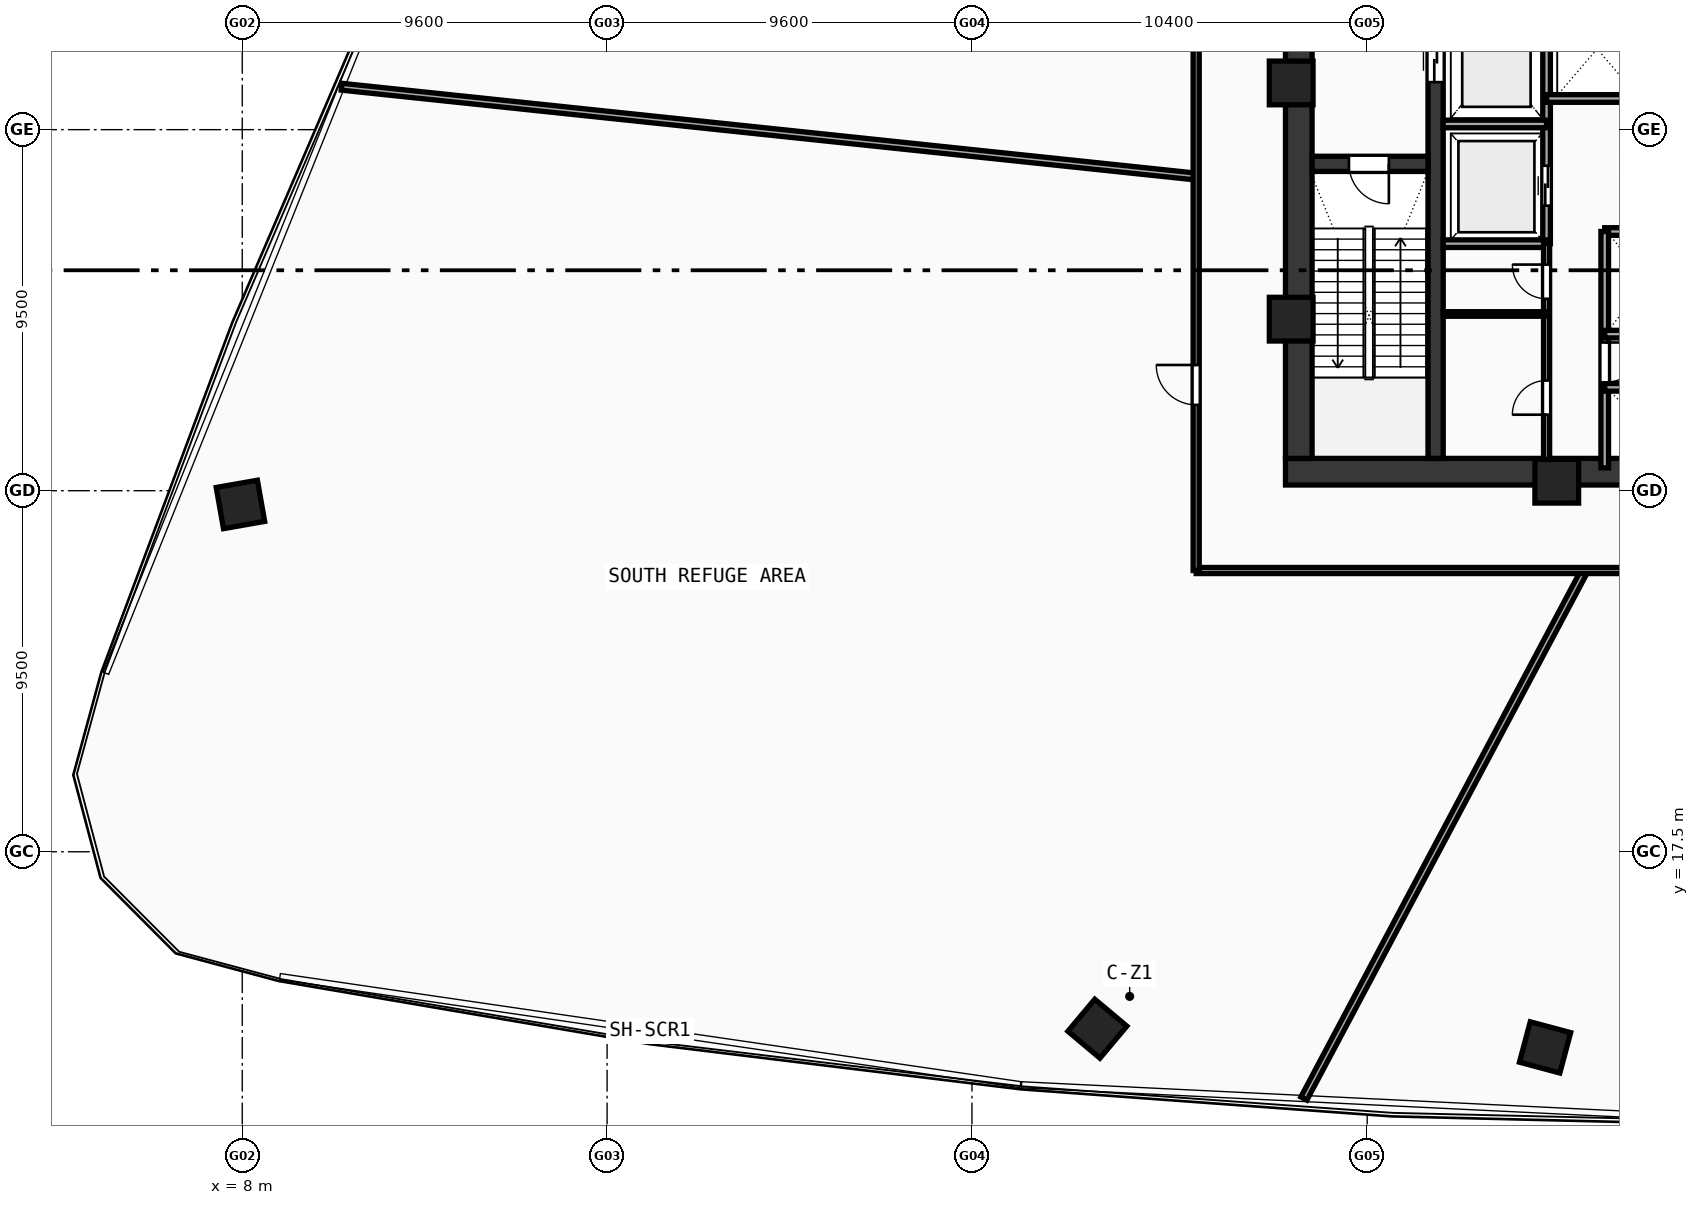
"""IFC4 building model, lengths in metres.
Left out: names, types, materials, properties, quantities, classifications, styles, units other than length and angle.
Written with IfcOpenShell. Run it as: python <this file> out.ifc"""

import sys

from ifc_helpers import new_model, si_unit, direction, frame, frame_2d, origin, origin_with_axes, origin_2d, place, context, subcontext, project, spatial, rectangle, hollow_rectangle, extrude, source, transform, mapped, element, fill, save


model = new_model("IFC4")
c1 = context("Model", 3, precision=1e-05, world=origin(), true_north=direction((0.0, 1.0)))
c2 = subcontext(c1, "Body", "Model", "MODEL_VIEW")
j1 = project(units=[si_unit("LENGTHUNIT", "METRE"), si_unit("PLANEANGLEUNIT", "RADIAN")], contexts=[c1])
p1 = place(None, origin())
s1 = spatial("IfcSite", under=j1, at=p1, CompositionType="ELEMENT")
p2 = place(p1, origin())
s2 = spatial("IfcBuilding", under=s1, at=p2, CompositionType="ELEMENT")
p3 = place(p2, frame((0.0, 0.0, 25.4)))
s3 = spatial("IfcBuildingStorey", under=s2, at=p3, CompositionType="ELEMENT", Elevation=25.4)
p4 = place(p3, frame((35.45, 27.5, 0.0), z_axis=(0.0, 0.0, 1.0), x_axis=(1.0, 0.0, 0.0)))
e1 = element("IfcWall", 1, at=p4, inside=s3, PredefinedType="SHEAR", context=c2, shape_type="SweptSolid", body=[
    extrude(rectangle(XDim=25.1, YDim=0.7, at=frame_2d((12.55, 0.0))), origin(), (0.0, 0.0, 1.0), 4.74),
])
p5 = place(p3, frame((35.8, 27.85, 0.0), z_axis=(0.0, 0.0, 1.0), x_axis=(0.0, 1.0, 0.0)))
e2 = element("IfcWall", 2, at=p5, inside=s3, PredefinedType="SHEAR", context=c2, shape_type="SweptSolid", body=[
    extrude(rectangle(XDim=12.0, YDim=0.7, at=frame_2d((6.0, 0.0))), origin(), (0.0, 0.0, 1.0), 4.74),
])
p6 = place(p3, frame((39.4, 27.85, 0.0), z_axis=(0.0, 0.0, 1.0), x_axis=(0.0, 1.0, 0.0)))
e3 = element("IfcWall", 3, at=p6, inside=s3, PredefinedType="SHEAR", context=c2, shape_type="SweptSolid", body=[
    extrude(rectangle(XDim=12.0, YDim=0.4, at=frame_2d((6.0, 0.0))), origin(), (0.0, 0.0, 1.0), 4.74),
])
p7 = place(p6, frame((9.9, 0.0, 0.0)))
e4 = element("IfcOpeningElement", 4, at=p7, cuts=e3, PredefinedType="OPENING", context=c2, shape_type="SweptSolid", body=[
    extrude(rectangle(XDim=1.1, YDim=2.1, at=frame_2d((0.55, 1.05))), frame((0.0, 0.21, 0.0), z_axis=(0.0, -1.0, 0.0), x_axis=(1.0, 0.0, 0.0)), (0.0, 0.0, 1.0), 0.42),
])
p8 = place(p3, frame((36.15, 35.6, 0.0), z_axis=(0.0, 0.0, 1.0), x_axis=(1.0, 0.0, 0.0)))
e5 = element("IfcWall", 5, at=p8, inside=s3, PredefinedType="SHEAR", context=c2, shape_type="SweptSolid", body=[
    extrude(rectangle(XDim=3.05, YDim=0.4, at=frame_2d((1.525, 0.0))), origin(), (0.0, 0.0, 1.0), 4.74),
])
p9 = place(p8, frame((0.97, 0.0, 0.0)))
e6 = element("IfcOpeningElement", 6, at=p9, cuts=e5, PredefinedType="OPENING", context=c2, shape_type="SweptSolid", body=[
    extrude(rectangle(XDim=1.05, YDim=2.1, at=frame_2d((0.525, 1.05))), frame((0.0, 0.21, 0.0), z_axis=(0.0, -1.0, 0.0), x_axis=(1.0, 0.0, 0.0)), (0.0, 0.0, 1.0), 0.42),
])
m1 = source(origin(), c2, "Body", "SweptSolid", [
    extrude(hollow_rectangle(XDim=1.15, YDim=1.15, WallThickness=0.048, at=origin_2d()), origin(), (0.0, 0.0, 1.0), 5.02),
])
for number, where, z_axis, x_axis in (
    (7, (42.588, 27.25, -0.28), (0.0, 0.0, 1.0), (1.0, 0.0, 0.0)),
    (8, (35.6, 37.729, -0.28), (0.0, 0.0, 1.0), (1.0, 0.0, 0.0)),
    (9, (35.6, 31.513, -0.28), (0.0, 0.0, 1.0), (1.0, 0.0, 0.0)),
):
    element("IfcColumn", number, at=place(p3, frame(where, z_axis=z_axis, x_axis=x_axis)), inside=s3, PredefinedType="COLUMN", context=c2, shape_type="MappedRepresentation", body=[
        mapped(m1, transform((0.0, 0.0, 0.0), scale=1.0)),
    ])
m2 = source(origin(), c2, "Body", "SweptSolid", [
    extrude(hollow_rectangle(XDim=1.1, YDim=1.1, WallThickness=0.045, at=origin_2d()), origin(), (0.0, 0.0, 1.0), 5.02),
])
for number, where, z_axis, x_axis in (
    (10, (30.5, 12.844, -0.28), (0.0, 0.0, 1.0), (0.766, -0.643, 0.0)),
    (11, (42.28, 12.352, -0.28), (0.0, 0.0, 1.0), (0.966, -0.259, 0.0)),
    (12, (7.952, 26.638, -0.28), (0.0, 0.0, 1.0), (0.174, -0.985, 0.0)),
):
    element("IfcColumn", number, at=place(p3, frame(where, z_axis=z_axis, x_axis=x_axis)), inside=s3, PredefinedType="COLUMN", context=c2, shape_type="MappedRepresentation", body=[
        mapped(m2, transform((0.0, 0.0, 0.0), scale=1.0)),
    ])
p10 = place(p3, frame((42.32, 33.5, 0.0), z_axis=(0.0, 0.0, 1.0), x_axis=(0.0, 1.0, 0.0)))
e13 = element("IfcWall", 13, at=p10, inside=s3, PredefinedType="SOLIDWALL", context=c2, shape_type="SweptSolid", body=[
    extrude(rectangle(XDim=6.45, YDim=0.2, at=frame_2d((3.225, 0.0))), origin(), (0.0, 0.0, 1.0), 4.74),
])
p11 = place(p10, frame((1.0, 0.0, 0.0)))
e14 = element("IfcOpeningElement", 14, at=p11, cuts=e13, PredefinedType="OPENING", context=c2, shape_type="SweptSolid", body=[
    extrude(rectangle(XDim=1.05, YDim=2.1, at=frame_2d((0.525, 1.05))), frame((0.0, 0.11, 0.0), z_axis=(0.0, -1.0, 0.0), x_axis=(1.0, 0.0, 0.0)), (0.0, 0.0, 1.0), 0.22),
])
for number, where, z_axis, x_axis in (
    (15, (39.6, 36.65, 0.0), (0.0, 0.0, 1.0), (1.0, 0.0, 0.0)),
    (16, (39.6, 33.5, 0.0), (0.0, 0.0, 1.0), (1.0, 0.0, 0.0)),
):
    element("IfcWall", number, at=place(p3, frame(where, z_axis=z_axis, x_axis=x_axis)), inside=s3, PredefinedType="SOLIDWALL", context=c2, shape_type="SweptSolid", body=[
        extrude(rectangle(XDim=2.72, YDim=0.2, at=frame_2d((1.36, 0.0))), origin(), (0.0, 0.0, 1.0), 4.74),
    ])
p12 = place(p3, frame((42.32, 37.32, 0.0), z_axis=(0.0, 0.0, 1.0), x_axis=(1.0, 0.0, 0.0)))
e17 = element("IfcWall", 17, at=p12, inside=s3, PredefinedType="SOLIDWALL", context=c2, shape_type="SweptSolid", body=[
    extrude(rectangle(XDim=4.73, YDim=0.2, at=frame_2d((2.365, 0.0))), origin(), (0.0, 0.0, 1.0), 4.74),
])
p13 = place(p3, frame((43.85, 33.82, 0.0), z_axis=(0.0, 0.0, 1.0), x_axis=(1.0, 0.0, 0.0)))
e18 = element("IfcWall", 18, at=p13, inside=s3, PredefinedType="SOLIDWALL", context=c2, shape_type="SweptSolid", body=[
    extrude(rectangle(XDim=9.83, YDim=0.2, at=frame_2d((4.915, 0.0))), origin(), (0.0, 0.0, 1.0), 4.74),
])
p14 = place(p3, frame((43.85, 27.6, 0.0), z_axis=(0.0, 0.0, 1.0), x_axis=(0.0, 1.0, 0.0)))
e19 = element("IfcWall", 19, at=p14, inside=s3, PredefinedType="SOLIDWALL", context=c2, shape_type="SweptSolid", body=[
    extrude(rectangle(XDim=6.22, YDim=0.2, at=frame_2d((3.11, 0.0))), origin(), (0.0, 0.0, 1.0), 4.74),
])
p15 = place(p14, frame((2.25, 0.0, 0.0)))
e20 = element("IfcOpeningElement", 20, at=p15, cuts=e19, PredefinedType="OPENING", context=c2, shape_type="SweptSolid", body=[
    extrude(rectangle(XDim=1.05, YDim=2.1, at=frame_2d((0.525, 1.05))), frame((0.0, 0.11, 0.0), z_axis=(0.0, -1.0, 0.0), x_axis=(1.0, 0.0, 0.0)), (0.0, 0.0, 1.0), 0.22),
])
p16 = place(p3, frame((43.85, 29.72, 0.0), z_axis=(0.0, 0.0, 1.0), x_axis=(1.0, 0.0, 0.0)))
e21 = element("IfcWall", 21, at=p16, inside=s3, PredefinedType="SOLIDWALL", context=c2, shape_type="SweptSolid", body=[
    extrude(rectangle(XDim=7.2, YDim=0.2, at=frame_2d((3.6, 0.0))), origin(), (0.0, 0.0, 1.0), 4.74),
])
p17 = place(p3, frame((43.85, 31.12, 0.0), z_axis=(0.0, 0.0, 1.0), x_axis=(1.0, 0.0, 0.0)))
e22 = element("IfcWall", 22, at=p17, inside=s3, PredefinedType="SOLIDWALL", context=c2, shape_type="SweptSolid", body=[
    extrude(rectangle(XDim=9.83, YDim=0.2, at=frame_2d((4.915, 0.0))), origin(), (0.0, 0.0, 1.0), 4.74),
])
p18 = place(p3, frame((42.32, 27.6, 0.0), z_axis=(0.0, 0.0, 1.0), x_axis=(0.0, 1.0, 0.0)))
e23 = element("IfcWall", 23, at=p18, inside=s3, PredefinedType="PARTITIONING", context=c2, shape_type="SweptSolid", body=[
    extrude(rectangle(XDim=5.9, YDim=0.16, at=frame_2d((2.95, 0.0))), origin(), (0.0, 0.0, 1.0), 4.74),
])
p19 = place(p18, frame((1.4, 0.0, 0.0)))
e24 = element("IfcOpeningElement", 24, at=p19, cuts=e23, PredefinedType="OPENING", context=c2, shape_type="SweptSolid", body=[
    extrude(rectangle(XDim=0.9, YDim=2.1, at=frame_2d((0.45, 1.05))), frame((0.0, 0.09, 0.0), z_axis=(0.0, -1.0, 0.0), x_axis=(1.0, 0.0, 0.0)), (0.0, 0.0, 1.0), 0.18),
])
p20 = place(p18, frame((4.45, 0.0, 0.0)))
e25 = element("IfcOpeningElement", 25, at=p20, cuts=e23, PredefinedType="OPENING", context=c2, shape_type="SweptSolid", body=[
    extrude(rectangle(XDim=0.9, YDim=2.1, at=frame_2d((0.45, 1.05))), frame((0.0, 0.09, 0.0), z_axis=(0.0, -1.0, 0.0), x_axis=(1.0, 0.0, 0.0)), (0.0, 0.0, 1.0), 0.18),
])
p21 = place(p3, frame((39.6, 31.65, 0.0), z_axis=(0.0, 0.0, 1.0), x_axis=(1.0, 0.0, 0.0)))
e26 = element("IfcWall", 26, at=p21, inside=s3, PredefinedType="PARTITIONING", context=c2, shape_type="SweptSolid", body=[
    extrude(rectangle(XDim=2.72, YDim=0.12, at=frame_2d((1.36, 0.0))), origin(), (0.0, 0.0, 1.0), 4.74),
])
p22 = place(p3, frame((33.1, 35.266, 0.0), z_axis=(0.0, 0.0, 1.0), x_axis=(-0.994522243654, 0.104525149493, 0.0)))
e27 = element("IfcWall", 27, at=p22, inside=s3, PredefinedType="PARTITIONING", context=c2, shape_type="SweptSolid", body=[
    extrude(rectangle(XDim=22.61, YDim=0.18, at=frame_2d((11.305, 0.0))), origin(), (0.0, 0.0, 1.0), 4.04),
])
p23 = place(p3, frame((43.321, 24.9, 0.0), z_axis=(0.0, 0.0, 1.0), x_axis=(-0.469478899312, -0.88294369192, 0.0)))
e28 = element("IfcWall", 28, at=p23, inside=s3, PredefinedType="PARTITIONING", context=c2, shape_type="SweptSolid", body=[
    extrude(rectangle(XDim=15.734, YDim=0.18, at=frame_2d((7.867, 0.0))), origin(), (0.0, 0.0, 1.0), 4.04),
])
p24 = place(p3, frame((62.9, 24.9, 0.0), z_axis=(0.0, 0.0, 1.0), x_axis=(-1.0, 0.0, 0.0)))
e29 = element("IfcWall", 29, at=p24, inside=s3, PredefinedType="PARTITIONING", context=c2, shape_type="SweptSolid", body=[
    extrude(rectangle(XDim=29.8, YDim=0.16, at=frame_2d((14.9, 0.0))), origin(), (0.0, 0.0, 1.0), 4.04),
])
p25 = place(p24, frame((14.375, 0.0, 0.0)))
e30 = element("IfcOpeningElement", 30, at=p25, cuts=e29, PredefinedType="OPENING", context=c2, shape_type="SweptSolid", body=[
    extrude(rectangle(XDim=1.05, YDim=2.1, at=frame_2d((0.525, 1.05))), frame((0.0, 0.09, 0.0), z_axis=(0.0, -1.0, 0.0), x_axis=(1.0, 0.0, 0.0)), (0.0, 0.0, 1.0), 0.18),
])
p26 = place(p3, frame((33.1, 24.9, 0.0), z_axis=(0.0, 0.0, 1.0), x_axis=(0.0, 1.0, 0.0)))
e31 = element("IfcWall", 31, at=p26, inside=s3, PredefinedType="PARTITIONING", context=c2, shape_type="SweptSolid", body=[
    extrude(rectangle(XDim=17.35, YDim=0.16, at=frame_2d((8.675, 0.0))), origin(), (0.0, 0.0, 1.0), 4.04),
])
p27 = place(p26, frame((4.358, 0.0, 0.0)))
e32 = element("IfcOpeningElement", 32, at=p27, cuts=e31, PredefinedType="OPENING", context=c2, shape_type="SweptSolid", body=[
    extrude(rectangle(XDim=1.05, YDim=2.1, at=frame_2d((0.525, 1.05))), frame((0.0, 0.09, 0.0), z_axis=(0.0, -1.0, 0.0), x_axis=(1.0, 0.0, 0.0)), (0.0, 0.0, 1.0), 0.18),
])
m3 = source(origin(), c2, "Body", "SweptSolid", [
    extrude(rectangle(XDim=1.05, YDim=2.1, at=frame_2d((0.525, 1.05))), frame((0.0, 0.025, 0.0), z_axis=(0.0, -1.0, 0.0), x_axis=(1.0, 0.0, 0.0)), (0.0, 0.0, 1.0), 0.05),
])
p28 = place(p9, frame((1.05, 0.0, 0.0), z_axis=(0.0, 0.0, 1.0), x_axis=(-1.0, 0.0, 0.0)))
e33 = element("IfcDoor", 33, at=p28, inside=s3, OperationType="SINGLE_SWING_LEFT", PredefinedType="DOOR", context=c2, shape_type="MappedRepresentation", body=[
    mapped(m3, transform((0.0, 0.0, 0.0), scale=1.0)),
])
fill(e6, e33)
m4 = source(origin(), c2, "Body", "SweptSolid", [
    extrude(rectangle(XDim=1.1, YDim=2.1, at=frame_2d((0.55, 1.05))), frame((0.0, 0.025, 0.0), z_axis=(0.0, -1.0, 0.0), x_axis=(1.0, 0.0, 0.0)), (0.0, 0.0, 1.0), 0.05),
])
p29 = place(p7, frame((1.1, 0.0, 0.0), z_axis=(0.0, 0.0, 1.0), x_axis=(-1.0, 0.0, 0.0)))
e34 = element("IfcDoor", 34, at=p29, inside=s3, OperationType="DOUBLE_DOOR_SLIDING", PredefinedType="DOOR", context=c2, shape_type="MappedRepresentation", body=[
    mapped(m4, transform((0.0, 0.0, 0.0), scale=1.0)),
])
fill(e4, e34)
p30 = place(p11, origin_with_axes())
e35 = element("IfcDoor", 35, at=p30, inside=s3, OperationType="DOUBLE_DOOR_SLIDING", PredefinedType="DOOR", context=c2, shape_type="MappedRepresentation", body=[
    mapped(m3, transform((0.0, 0.0, 0.0), scale=1.0)),
])
fill(e14, e35)
p31 = place(p15, frame((1.05, 0.0, 0.0), z_axis=(0.0, 0.0, 1.0), x_axis=(-1.0, 0.0, 0.0)))
e36 = element("IfcDoor", 36, at=p31, inside=s3, OperationType="SINGLE_SWING_LEFT", PredefinedType="DOOR", context=c2, shape_type="MappedRepresentation", body=[
    mapped(m3, transform((0.0, 0.0, 0.0), scale=1.0)),
])
fill(e20, e36)
m5 = source(origin(), c2, "Body", "SweptSolid", [
    extrude(rectangle(XDim=0.9, YDim=2.1, at=frame_2d((0.45, 1.05))), frame((0.0, 0.025, 0.0), z_axis=(0.0, -1.0, 0.0), x_axis=(1.0, 0.0, 0.0)), (0.0, 0.0, 1.0), 0.05),
])
p32 = place(p19, origin_with_axes())
e37 = element("IfcDoor", 37, at=p32, inside=s3, OperationType="SINGLE_SWING_LEFT", PredefinedType="DOOR", context=c2, shape_type="MappedRepresentation", body=[
    mapped(m5, transform((0.0, 0.0, 0.0), scale=1.0)),
])
fill(e24, e37)
p33 = place(p20, origin_with_axes())
e38 = element("IfcDoor", 38, at=p33, inside=s3, OperationType="SINGLE_SWING_RIGHT", PredefinedType="DOOR", context=c2, shape_type="MappedRepresentation", body=[
    mapped(m5, transform((0.0, 0.0, 0.0), scale=1.0)),
])
fill(e25, e38)
p34 = place(p27, origin_with_axes())
e39 = element("IfcDoor", 39, at=p34, inside=s3, OperationType="SINGLE_SWING_RIGHT", PredefinedType="DOOR", context=c2, shape_type="MappedRepresentation", body=[
    mapped(m3, transform((0.0, 0.0, 0.0), scale=1.0)),
])
fill(e32, e39)
save(model, sys.argv[1])
